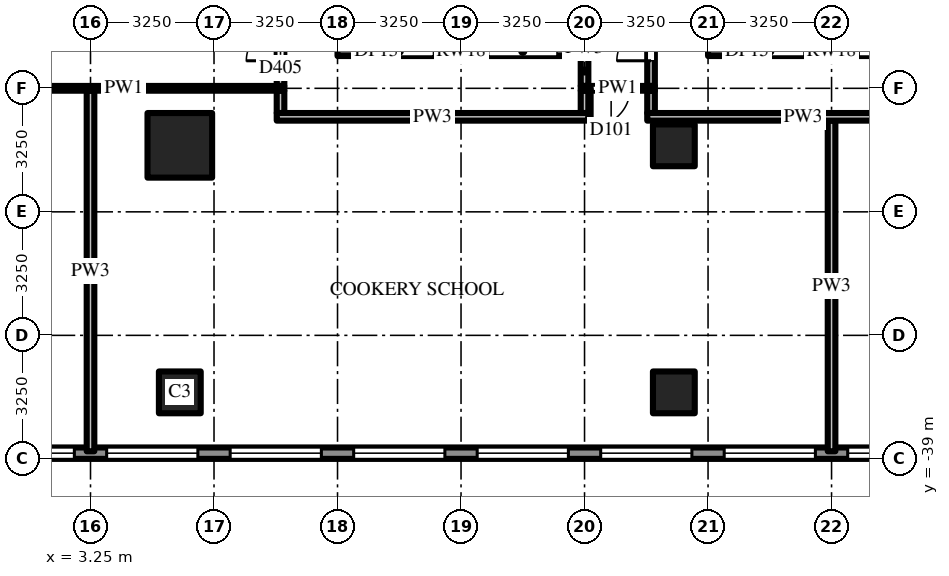
"""IFC4 building model, lengths in metres.
Left out: names, types, materials, properties, quantities, classifications, styles, units other than length and angle.
Written with IfcOpenShell. Run it as: python <this file> out.ifc"""

import sys

from ifc_helpers import new_model, si_unit, direction, frame, frame_2d, origin, origin_2d, place, context, subcontext, project, spatial, rectangle, extrude, source, transform, mapped, element, fill, save


model = new_model("IFC4")
c1 = context("Model", 3, precision=1e-05, world=origin(), true_north=direction((0.0, 1.0)))
c2 = subcontext(c1, "Body", "Model", "MODEL_VIEW")
j1 = project(units=[si_unit("LENGTHUNIT", "METRE"), si_unit("PLANEANGLEUNIT", "RADIAN")], contexts=[c1])
p1 = place(None, origin())
s1 = spatial("IfcSite", under=j1, at=p1, CompositionType="ELEMENT")
p2 = place(p1, origin())
s2 = spatial("IfcBuilding", under=s1, at=p2, CompositionType="ELEMENT")
p3 = place(p2, frame((0.0, 0.0, 14.0)))
s3 = spatial("IfcBuildingStorey", under=s2, at=p3, CompositionType="ELEMENT", Elevation=14.0)
m1 = source(origin(), c2, "Body", "SweptSolid", [
    extrude(rectangle(XDim=1.7, YDim=1.7, at=origin_2d()), origin(), (0.0, 0.0, 1.0), 5.0),
])
p4 = place(p3, frame((5.6, -30.75, 0.0), z_axis=(0.0, 0.0, 1.0), x_axis=(1.0, 0.0, 0.0)))
e1 = element("IfcColumn", 1, at=p4, inside=s3, PredefinedType="COLUMN", context=c2, shape_type="MappedRepresentation", body=[
    mapped(m1, transform((0.0, 0.0, 0.0))),
])
m2 = source(origin(), c2, "Body", "SweptSolid", [
    extrude(rectangle(XDim=1.1, YDim=1.1, at=origin_2d()), origin(), (0.0, 0.0, 1.0), 5.0),
])
for number, where, z_axis, x_axis in (
    (2, (5.6, -37.25, 0.0), (0.0, 0.0, 1.0), (1.0, 0.0, 0.0)),
    (3, (18.6, -30.75, 0.0), (0.0, 0.0, 1.0), (1.0, 0.0, 0.0)),
    (4, (18.6, -37.25, 0.0), (0.0, 0.0, 1.0), (1.0, 0.0, 0.0)),
):
    element("IfcColumn", number, at=place(p3, frame(where, z_axis=z_axis, x_axis=x_axis)), inside=s3, PredefinedType="COLUMN", context=c2, shape_type="MappedRepresentation", body=[
        mapped(m2, transform((0.0, 0.0, 0.0))),
    ])
m3 = source(origin(), c2, "Body", "SweptSolid", [
    extrude(rectangle(XDim=6.5, YDim=0.25, at=frame_2d((3.25, 0.0))), origin(), (0.0, 0.0, 1.0), 4.7),
])
p5 = place(p3, frame((9.75, -28.275, 0.0), z_axis=(0.0, 0.0, 1.0), x_axis=(1.0, 0.0, 0.0)))
e5 = element("IfcWall", 5, at=p5, inside=s3, PredefinedType="SHEAR", context=c2, shape_type="MappedRepresentation", body=[
    mapped(m3, transform((0.0, 0.0, 0.0))),
])
m4 = source(origin(), c2, "Body", "SweptSolid", [
    extrude(rectangle(XDim=1.8, YDim=2.1, at=frame_2d((0.9, 1.05))), frame((0.0, 0.135, 0.0), z_axis=(0.0, -1.0, 0.0), x_axis=(1.0, 0.0, 0.0)), (0.0, 0.0, 1.0), 0.27),
])
p6 = place(p5, frame((0.725, 0.0, 0.0)))
e6 = element("IfcOpeningElement", 6, at=p6, cuts=e5, PredefinedType="OPENING", context=c2, shape_type="MappedRepresentation", body=[
    mapped(m4, transform((0.0, 0.0, 0.0))),
])
p7 = place(p5, frame((3.975, 0.0, 0.0)))
e7 = element("IfcOpeningElement", 7, at=p7, cuts=e5, PredefinedType="OPENING", context=c2, shape_type="MappedRepresentation", body=[
    mapped(m4, transform((0.0, 0.0, 0.0))),
])
p8 = place(p3, frame((19.5, -28.275, 0.0), z_axis=(0.0, 0.0, 1.0), x_axis=(1.0, 0.0, 0.0)))
e8 = element("IfcWall", 8, at=p8, inside=s3, PredefinedType="SHEAR", context=c2, shape_type="MappedRepresentation", body=[
    mapped(m3, transform((0.0, 0.0, 0.0))),
])
p9 = place(p8, frame((0.725, 0.0, 0.0)))
e9 = element("IfcOpeningElement", 9, at=p9, cuts=e8, PredefinedType="OPENING", context=c2, shape_type="MappedRepresentation", body=[
    mapped(m4, transform((0.0, 0.0, 0.0))),
])
p10 = place(p8, frame((3.975, 0.0, 0.0)))
e10 = element("IfcOpeningElement", 10, at=p10, cuts=e8, PredefinedType="OPENING", context=c2, shape_type="MappedRepresentation", body=[
    mapped(m4, transform((0.0, 0.0, 0.0))),
])
m5 = source(origin(), c2, "Body", "SweptSolid", [
    extrude(rectangle(XDim=71.5, YDim=0.3, at=frame_2d((35.75, 0.0))), origin(), (0.0, 0.0, 1.0), 4.7),
])
p11 = place(p3, frame((-35.75, -38.85, 0.0), z_axis=(0.0, 0.0, 1.0), x_axis=(1.0, 0.0, 0.0)))
e11 = element("IfcWall", 11, at=p11, inside=s3, PredefinedType="SOLIDWALL", context=c2, shape_type="MappedRepresentation", body=[
    mapped(m5, transform((0.0, 0.0, 0.0))),
])
m6 = source(origin(), c2, "Body", "SweptSolid", [
    extrude(rectangle(XDim=2.4, YDim=3.0, at=frame_2d((1.2, 1.5))), frame((0.0, 0.16, 0.0), z_axis=(0.0, -1.0, 0.0), x_axis=(1.0, 0.0, 0.0)), (0.0, 0.0, 1.0), 0.32),
])
p12 = place(p11, frame((0.425, 0.0, 0.9)))
e12 = element("IfcOpeningElement", 12, at=p12, cuts=e11, PredefinedType="OPENING", context=c2, shape_type="MappedRepresentation", body=[
    mapped(m6, transform((0.0, 0.0, 0.0))),
])
p13 = place(p11, frame((3.675, 0.0, 0.9)))
e13 = element("IfcOpeningElement", 13, at=p13, cuts=e11, PredefinedType="OPENING", context=c2, shape_type="MappedRepresentation", body=[
    mapped(m6, transform((0.0, 0.0, 0.0))),
])
p14 = place(p11, frame((6.925, 0.0, 0.9)))
e14 = element("IfcOpeningElement", 14, at=p14, cuts=e11, PredefinedType="OPENING", context=c2, shape_type="MappedRepresentation", body=[
    mapped(m6, transform((0.0, 0.0, 0.0))),
])
p15 = place(p11, frame((10.175, 0.0, 0.9)))
e15 = element("IfcOpeningElement", 15, at=p15, cuts=e11, PredefinedType="OPENING", context=c2, shape_type="MappedRepresentation", body=[
    mapped(m6, transform((0.0, 0.0, 0.0))),
])
p16 = place(p11, frame((13.425, 0.0, 0.9)))
e16 = element("IfcOpeningElement", 16, at=p16, cuts=e11, PredefinedType="OPENING", context=c2, shape_type="MappedRepresentation", body=[
    mapped(m6, transform((0.0, 0.0, 0.0))),
])
p17 = place(p11, frame((16.675, 0.0, 0.9)))
e17 = element("IfcOpeningElement", 17, at=p17, cuts=e11, PredefinedType="OPENING", context=c2, shape_type="MappedRepresentation", body=[
    mapped(m6, transform((0.0, 0.0, 0.0))),
])
p18 = place(p11, frame((19.925, 0.0, 0.9)))
e18 = element("IfcOpeningElement", 18, at=p18, cuts=e11, PredefinedType="OPENING", context=c2, shape_type="MappedRepresentation", body=[
    mapped(m6, transform((0.0, 0.0, 0.0))),
])
p19 = place(p11, frame((23.175, 0.0, 0.9)))
e19 = element("IfcOpeningElement", 19, at=p19, cuts=e11, PredefinedType="OPENING", context=c2, shape_type="MappedRepresentation", body=[
    mapped(m6, transform((0.0, 0.0, 0.0))),
])
p20 = place(p11, frame((26.425, 0.0, 0.9)))
e20 = element("IfcOpeningElement", 20, at=p20, cuts=e11, PredefinedType="OPENING", context=c2, shape_type="MappedRepresentation", body=[
    mapped(m6, transform((0.0, 0.0, 0.0))),
])
p21 = place(p11, frame((29.675, 0.0, 0.9)))
e21 = element("IfcOpeningElement", 21, at=p21, cuts=e11, PredefinedType="OPENING", context=c2, shape_type="MappedRepresentation", body=[
    mapped(m6, transform((0.0, 0.0, 0.0))),
])
p22 = place(p11, frame((32.925, 0.0, 0.9)))
e22 = element("IfcOpeningElement", 22, at=p22, cuts=e11, PredefinedType="OPENING", context=c2, shape_type="MappedRepresentation", body=[
    mapped(m6, transform((0.0, 0.0, 0.0))),
])
p23 = place(p11, frame((36.175, 0.0, 0.9)))
e23 = element("IfcOpeningElement", 23, at=p23, cuts=e11, PredefinedType="OPENING", context=c2, shape_type="MappedRepresentation", body=[
    mapped(m6, transform((0.0, 0.0, 0.0))),
])
p24 = place(p11, frame((39.425, 0.0, 0.9)))
e24 = element("IfcOpeningElement", 24, at=p24, cuts=e11, PredefinedType="OPENING", context=c2, shape_type="MappedRepresentation", body=[
    mapped(m6, transform((0.0, 0.0, 0.0))),
])
p25 = place(p11, frame((42.675, 0.0, 0.9)))
e25 = element("IfcOpeningElement", 25, at=p25, cuts=e11, PredefinedType="OPENING", context=c2, shape_type="MappedRepresentation", body=[
    mapped(m6, transform((0.0, 0.0, 0.0))),
])
p26 = place(p11, frame((45.925, 0.0, 0.9)))
e26 = element("IfcOpeningElement", 26, at=p26, cuts=e11, PredefinedType="OPENING", context=c2, shape_type="MappedRepresentation", body=[
    mapped(m6, transform((0.0, 0.0, 0.0))),
])
p27 = place(p11, frame((49.175, 0.0, 0.9)))
e27 = element("IfcOpeningElement", 27, at=p27, cuts=e11, PredefinedType="OPENING", context=c2, shape_type="MappedRepresentation", body=[
    mapped(m6, transform((0.0, 0.0, 0.0))),
])
p28 = place(p11, frame((52.425, 0.0, 0.9)))
e28 = element("IfcOpeningElement", 28, at=p28, cuts=e11, PredefinedType="OPENING", context=c2, shape_type="MappedRepresentation", body=[
    mapped(m6, transform((0.0, 0.0, 0.0))),
])
p29 = place(p11, frame((55.675, 0.0, 0.9)))
e29 = element("IfcOpeningElement", 29, at=p29, cuts=e11, PredefinedType="OPENING", context=c2, shape_type="MappedRepresentation", body=[
    mapped(m6, transform((0.0, 0.0, 0.0))),
])
p30 = place(p11, frame((58.925, 0.0, 0.9)))
e30 = element("IfcOpeningElement", 30, at=p30, cuts=e11, PredefinedType="OPENING", context=c2, shape_type="MappedRepresentation", body=[
    mapped(m6, transform((0.0, 0.0, 0.0))),
])
p31 = place(p11, frame((62.175, 0.0, 0.9)))
e31 = element("IfcOpeningElement", 31, at=p31, cuts=e11, PredefinedType="OPENING", context=c2, shape_type="MappedRepresentation", body=[
    mapped(m6, transform((0.0, 0.0, 0.0))),
])
p32 = place(p11, frame((65.425, 0.0, 0.9)))
e32 = element("IfcOpeningElement", 32, at=p32, cuts=e11, PredefinedType="OPENING", context=c2, shape_type="MappedRepresentation", body=[
    mapped(m6, transform((0.0, 0.0, 0.0))),
])
p33 = place(p11, frame((68.675, 0.0, 0.9)))
e33 = element("IfcOpeningElement", 33, at=p33, cuts=e11, PredefinedType="OPENING", context=c2, shape_type="MappedRepresentation", body=[
    mapped(m6, transform((0.0, 0.0, 0.0))),
])
m7 = source(origin(), c2, "Body", "SweptSolid", [
    extrude(rectangle(XDim=9.488, YDim=0.2, at=frame_2d((4.744, 0.0))), origin(), (0.0, 0.0, 1.0), 3.918),
])
p34 = place(p3, frame((3.25, -38.8, 0.0), z_axis=(0.0, 0.0, 1.0), x_axis=(0.0, 1.0, 0.0)))
e34 = element("IfcWall", 34, at=p34, inside=s3, PredefinedType="PARTITIONING", context=c2, shape_type="MappedRepresentation", body=[
    mapped(m7, transform((0.0, 0.0, 0.0))),
])
m8 = source(origin(), c2, "Body", "SweptSolid", [
    extrude(rectangle(XDim=3.087, YDim=0.2, at=frame_2d((1.544, 0.0))), origin(), (0.0, 0.0, 1.0), 4.274),
])
p35 = place(p3, frame((8.25, -29.188, 0.0), z_axis=(0.0, 0.0, 1.0), x_axis=(0.0, 1.0, 0.0)))
e35 = element("IfcWall", 35, at=p35, inside=s3, PredefinedType="PARTITIONING", context=c2, shape_type="MappedRepresentation", body=[
    mapped(m8, transform((0.0, 0.0, 0.0))),
])
m9 = source(origin(), c2, "Body", "SweptSolid", [
    extrude(rectangle(XDim=1.8, YDim=2.1, at=frame_2d((0.9, 1.05))), frame((0.0, 0.11, 0.0), z_axis=(0.0, -1.0, 0.0), x_axis=(1.0, 0.0, 0.0)), (0.0, 0.0, 1.0), 0.22),
])
p36 = place(p35, frame((0.663, 0.0, 0.0)))
e36 = element("IfcOpeningElement", 36, at=p36, cuts=e35, PredefinedType="OPENING", context=c2, shape_type="MappedRepresentation", body=[
    mapped(m9, transform((0.0, 0.0, 0.0))),
])
m10 = source(origin(), c2, "Body", "SweptSolid", [
    extrude(rectangle(XDim=0.587, YDim=0.2, at=frame_2d((0.294, 0.0))), origin(), (0.0, 0.0, 1.0), 4.7),
])
p37 = place(p3, frame((8.25, -29.312, 0.0), z_axis=(0.0, 0.0, 1.0), x_axis=(0.0, -1.0, 0.0)))
e37 = element("IfcWall", 37, at=p37, inside=s3, PredefinedType="PARTITIONING", context=c2, shape_type="MappedRepresentation", body=[
    mapped(m10, transform((0.0, 0.0, 0.0))),
])
m11 = source(origin(), c2, "Body", "SweptSolid", [
    extrude(rectangle(XDim=0.788, YDim=0.2, at=frame_2d((0.394, 0.0))), origin(), (0.0, 0.0, 1.0), 4.7),
])
p38 = place(p3, frame((16.25, -29.188, 0.0), z_axis=(0.0, 0.0, 1.0), x_axis=(0.0, 1.0, 0.0)))
e38 = element("IfcWall", 38, at=p38, inside=s3, PredefinedType="PARTITIONING", context=c2, shape_type="MappedRepresentation", body=[
    mapped(m11, transform((0.0, 0.0, 0.0))),
])
p39 = place(p3, frame((16.25, -29.9, 0.0), z_axis=(0.0, 0.0, 1.0), x_axis=(0.0, 1.0, 0.0)))
e39 = element("IfcWall", 39, at=p39, inside=s3, PredefinedType="PARTITIONING", context=c2, shape_type="MappedRepresentation", body=[
    mapped(m10, transform((0.0, 0.0, 0.0))),
])
p40 = place(p3, frame((18.0, -29.188, 0.0), z_axis=(0.0, 0.0, 1.0), x_axis=(0.0, 1.0, 0.0)))
e40 = element("IfcWall", 40, at=p40, inside=s3, PredefinedType="PARTITIONING", context=c2, shape_type="MappedRepresentation", body=[
    mapped(m8, transform((0.0, 0.0, 0.0))),
])
p41 = place(p40, frame((0.663, 0.0, 0.0)))
e41 = element("IfcOpeningElement", 41, at=p41, cuts=e40, PredefinedType="OPENING", context=c2, shape_type="MappedRepresentation", body=[
    mapped(m9, transform((0.0, 0.0, 0.0))),
])
p42 = place(p3, frame((18.0, -29.9, 0.0), z_axis=(0.0, 0.0, 1.0), x_axis=(0.0, 1.0, 0.0)))
e42 = element("IfcWall", 42, at=p42, inside=s3, PredefinedType="PARTITIONING", context=c2, shape_type="MappedRepresentation", body=[
    mapped(m10, transform((0.0, 0.0, 0.0))),
])
m12 = source(origin(), c2, "Body", "SweptSolid", [
    extrude(rectangle(XDim=8.7, YDim=0.2, at=frame_2d((4.35, 0.0))), origin(), (0.0, 0.0, 1.0), 3.762),
])
p43 = place(p3, frame((22.75, -38.8, 0.0), z_axis=(0.0, 0.0, 1.0), x_axis=(0.0, 1.0, 0.0)))
e43 = element("IfcWall", 43, at=p43, inside=s3, PredefinedType="PARTITIONING", context=c2, shape_type="MappedRepresentation", body=[
    mapped(m12, transform((0.0, 0.0, 0.0))),
])
m13 = source(origin(), c2, "Body", "SweptSolid", [
    extrude(rectangle(XDim=8.2, YDim=0.2, at=frame_2d((4.1, 0.0))), origin(), (0.0, 0.0, 1.0), 4.7),
])
p44 = place(p3, frame((16.35, -30.0, 0.0), z_axis=(0.0, 0.0, 1.0), x_axis=(-1.0, 0.0, 0.0)))
e44 = element("IfcWall", 44, at=p44, inside=s3, PredefinedType="PARTITIONING", context=c2, shape_type="MappedRepresentation", body=[
    mapped(m13, transform((0.0, 0.0, 0.0))),
])
m14 = source(origin(), c2, "Body", "SweptSolid", [
    extrude(rectangle(XDim=8.2, YDim=0.2, at=frame_2d((4.1, 0.0))), origin(), (0.0, 0.0, 1.0), 3.762),
])
p45 = place(p3, frame((26.1, -30.0, 0.0), z_axis=(0.0, 0.0, 1.0), x_axis=(-1.0, 0.0, 0.0)))
e45 = element("IfcWall", 45, at=p45, inside=s3, PredefinedType="PARTITIONING", context=c2, shape_type="MappedRepresentation", body=[
    mapped(m14, transform((0.0, 0.0, 0.0))),
])
p46 = place(p3, frame((8.35, -29.25, 0.0), z_axis=(0.0, 0.0, 1.0), x_axis=(-1.0, 0.0, 0.0)))
e46 = element("IfcWall", 46, at=p46, inside=s3, PredefinedType="PARTITIONING", context=c2, shape_type="SweptSolid", body=[
    extrude(rectangle(XDim=8.45, YDim=0.125, at=frame_2d((4.225, 0.0))), origin(), (0.0, 0.0, 1.0), 3.918),
])
m15 = source(origin(), c2, "Body", "SweptSolid", [
    extrude(rectangle(XDim=1.95, YDim=0.125, at=frame_2d((0.975, 0.0))), origin(), (0.0, 0.0, 1.0), 4.7),
])
p47 = place(p3, frame((18.1, -29.25, 0.0), z_axis=(0.0, 0.0, 1.0), x_axis=(-1.0, 0.0, 0.0)))
e47 = element("IfcWall", 47, at=p47, inside=s3, PredefinedType="PARTITIONING", context=c2, shape_type="MappedRepresentation", body=[
    mapped(m15, transform((0.0, 0.0, 0.0))),
])
m16 = source(origin(), c2, "Body", "SweptSolid", [
    extrude(rectangle(XDim=1.0, YDim=2.1, at=frame_2d((0.5, 1.05))), frame((0.0, 0.073, 0.0), z_axis=(0.0, -1.0, 0.0), x_axis=(1.0, 0.0, 0.0)), (0.0, 0.0, 1.0), 0.145),
])
p48 = place(p47, frame((0.65, 0.0, 0.0)))
e48 = element("IfcOpeningElement", 48, at=p48, cuts=e47, PredefinedType="OPENING", context=c2, shape_type="MappedRepresentation", body=[
    mapped(m16, transform((0.0, 0.0, 0.0))),
])
m17 = source(origin(), c2, "Body", "SweptSolid", [
    extrude(rectangle(XDim=2.4, YDim=3.0, at=frame_2d((1.2, 1.5))), frame((0.0, 0.03, 0.0), z_axis=(0.0, -1.0, 0.0), x_axis=(1.0, 0.0, 0.0)), (0.0, 0.0, 1.0), 0.06),
])
p49 = place(p23, origin())
e49 = element("IfcWindow", 49, at=p49, inside=s3, PartitioningType="SINGLE_PANEL", PredefinedType="WINDOW", context=c2, shape_type="MappedRepresentation", body=[
    mapped(m17, transform((0.0, 0.0, 0.0))),
])
fill(e23, e49)
p50 = place(p24, origin())
e50 = element("IfcWindow", 50, at=p50, inside=s3, PartitioningType="SINGLE_PANEL", PredefinedType="WINDOW", context=c2, shape_type="MappedRepresentation", body=[
    mapped(m17, transform((0.0, 0.0, 0.0))),
])
fill(e24, e50)
p51 = place(p25, origin())
e51 = element("IfcWindow", 51, at=p51, inside=s3, PartitioningType="SINGLE_PANEL", PredefinedType="WINDOW", context=c2, shape_type="MappedRepresentation", body=[
    mapped(m17, transform((0.0, 0.0, 0.0))),
])
fill(e25, e51)
p52 = place(p26, origin())
e52 = element("IfcWindow", 52, at=p52, inside=s3, PartitioningType="SINGLE_PANEL", PredefinedType="WINDOW", context=c2, shape_type="MappedRepresentation", body=[
    mapped(m17, transform((0.0, 0.0, 0.0))),
])
fill(e26, e52)
p53 = place(p27, origin())
e53 = element("IfcWindow", 53, at=p53, inside=s3, PartitioningType="SINGLE_PANEL", PredefinedType="WINDOW", context=c2, shape_type="MappedRepresentation", body=[
    mapped(m17, transform((0.0, 0.0, 0.0))),
])
fill(e27, e53)
p54 = place(p28, origin())
e54 = element("IfcWindow", 54, at=p54, inside=s3, PartitioningType="SINGLE_PANEL", PredefinedType="WINDOW", context=c2, shape_type="MappedRepresentation", body=[
    mapped(m17, transform((0.0, 0.0, 0.0))),
])
fill(e28, e54)
p55 = place(p29, origin())
e55 = element("IfcWindow", 55, at=p55, inside=s3, PartitioningType="SINGLE_PANEL", PredefinedType="WINDOW", context=c2, shape_type="MappedRepresentation", body=[
    mapped(m17, transform((0.0, 0.0, 0.0))),
])
fill(e29, e55)
p56 = place(p30, origin())
e56 = element("IfcWindow", 56, at=p56, inside=s3, PartitioningType="SINGLE_PANEL", PredefinedType="WINDOW", context=c2, shape_type="MappedRepresentation", body=[
    mapped(m17, transform((0.0, 0.0, 0.0))),
])
fill(e30, e56)
m18 = source(origin(), c2, "Body", "SweptSolid", [
    extrude(rectangle(XDim=1.0, YDim=2.1, at=frame_2d((0.5, 1.05))), frame((0.0, 0.025, 0.0), z_axis=(0.0, -1.0, 0.0), x_axis=(1.0, 0.0, 0.0)), (0.0, 0.0, 1.0), 0.05),
])
p57 = place(p48, origin())
e57 = element("IfcDoor", 57, at=p57, inside=s3, OperationType="SINGLE_SWING_RIGHT", PredefinedType="DOOR", context=c2, shape_type="MappedRepresentation", body=[
    mapped(m18, transform((0.0, 0.0, 0.0))),
])
fill(e48, e57)
m19 = source(origin(), c2, "Body", "SweptSolid", [
    extrude(rectangle(XDim=1.8, YDim=2.1, at=frame_2d((0.9, 1.05))), frame((0.0, 0.025, 0.0), z_axis=(0.0, -1.0, 0.0), x_axis=(1.0, 0.0, 0.0)), (0.0, 0.0, 1.0), 0.05),
])
p58 = place(p36, origin())
e58 = element("IfcDoor", 58, at=p58, inside=s3, OperationType="DOUBLE_DOOR_SINGLE_SWING", PredefinedType="DOOR", context=c2, shape_type="MappedRepresentation", body=[
    mapped(m19, transform((0.0, 0.0, 0.0))),
])
fill(e36, e58)
p59 = place(p41, origin())
e59 = element("IfcDoor", 59, at=p59, inside=s3, OperationType="DOUBLE_DOOR_SINGLE_SWING", PredefinedType="DOOR", context=c2, shape_type="MappedRepresentation", body=[
    mapped(m19, transform((0.0, 0.0, 0.0))),
])
fill(e41, e59)
save(model, sys.argv[1])
